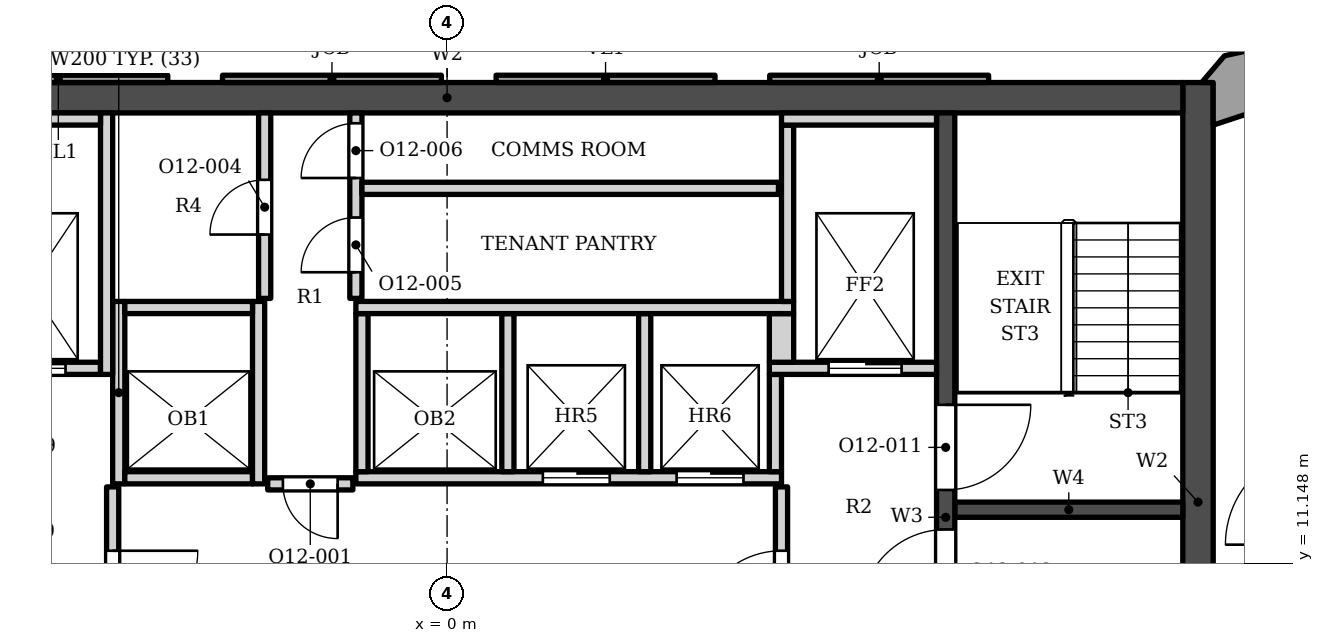
"""IFC4 building model, lengths in metres.
Left out: names, types, materials, properties, quantities, classifications, styles, units other than length and angle.
Written with IfcOpenShell. Run it as: python <this file> out.ifc"""

import sys

from ifc_helpers import new_model, si_unit, direction, frame, frame_2d, origin, place, context, subcontext, project, spatial, polyline, rectangle, outline, extrude, element, fill, save


model = new_model("IFC4")
c1 = context("Model", 3, precision=1e-05, world=origin(), true_north=direction((0.0, 1.0)))
c2 = subcontext(c1, "Body", "Model", "MODEL_VIEW")
j1 = project(units=[si_unit("LENGTHUNIT", "METRE"), si_unit("PLANEANGLEUNIT", "RADIAN")], contexts=[c1])
p1 = place(None, origin())
s1 = spatial("IfcSite", under=j1, at=p1, CompositionType="ELEMENT")
p2 = place(p1, origin())
s2 = spatial("IfcBuilding", under=s1, at=p2, CompositionType="ELEMENT")
p3 = place(p2, frame((0.0, 0.0, 279.4)))
s3 = spatial("IfcBuildingStorey", under=s2, at=p3, CompositionType="ELEMENT", Elevation=279.4)
p4 = place(p3, frame((-12.1, 18.802, 0.0), z_axis=(0.0, 0.0, 1.0), x_axis=(1.0, 0.0, 0.0)))
e1 = element("IfcWall", 1, at=p4, inside=s3, PredefinedType="SHEAR", context=c2, shape_type="SweptSolid", body=[
    extrude(rectangle(XDim=24.2, YDim=0.5, at=frame_2d((12.1, 0.0))), origin(), (0.0, 0.0, 1.0), 3.9),
])
p5 = place(p3, frame((12.35, 5.253, 0.0), z_axis=(0.0, 0.0, 1.0), x_axis=(0.0, 1.0, 0.0)))
e2 = element("IfcWall", 2, at=p5, inside=s3, PredefinedType="SHEAR", context=c2, shape_type="SweptSolid", body=[
    extrude(rectangle(XDim=13.8, YDim=0.5, at=frame_2d((6.9, 0.0))), origin(), (0.0, 0.0, 1.0), 3.9),
])
p6 = place(p3, frame((8.2, 5.253, 0.0), z_axis=(0.0, 0.0, 1.0), x_axis=(0.0, 1.0, 0.0)))
e3 = element("IfcWall", 3, at=p6, inside=s3, PredefinedType="SHEAR", context=c2, shape_type="SweptSolid", body=[
    extrude(rectangle(XDim=13.3, YDim=0.3, at=frame_2d((6.65, 0.0))), origin(), (0.0, 0.0, 1.0), 3.9),
])
p7 = place(p6, frame((7.1, 0.0, 0.0)))
e4 = element("IfcOpeningElement", 4, at=p7, cuts=e3, PredefinedType="OPENING", context=c2, shape_type="SweptSolid", body=[
    extrude(rectangle(XDim=1.4, YDim=2.1, at=frame_2d((0.7, 1.05))), frame((0.0, 0.16, 0.0), z_axis=(0.0, -1.0, 0.0), x_axis=(1.0, 0.0, 0.0)), (0.0, 0.0, 1.0), 0.32),
])
p8 = place(p6, frame((5.05, 0.0, 0.0)))
e5 = element("IfcOpeningElement", 5, at=p8, cuts=e3, PredefinedType="OPENING", context=c2, shape_type="SweptSolid", body=[
    extrude(rectangle(XDim=1.4, YDim=2.1, at=frame_2d((0.7, 1.05))), frame((0.0, 0.16, 0.0), z_axis=(0.0, -1.0, 0.0), x_axis=(1.0, 0.0, 0.0)), (0.0, 0.0, 1.0), 0.32),
])
p9 = place(p3, frame((8.35, 12.028, 0.0), z_axis=(0.0, 0.0, 1.0), x_axis=(1.0, 0.0, 0.0)))
e6 = element("IfcWall", 6, at=p9, inside=s3, PredefinedType="SHEAR", context=c2, shape_type="SweptSolid", body=[
    extrude(rectangle(XDim=3.75, YDim=0.25, at=frame_2d((1.875, 0.0))), origin(), (0.0, 0.0, 1.0), 3.9),
])
p10 = place(p3, origin())
e7 = element("IfcWall", 7, at=p10, inside=s3, PredefinedType="SOLIDWALL", context=c2, shape_type="SweptSolid", body=[
    extrude(outline(polyline([(5.306, 19.173), (5.306, 19.052), (8.906, 19.052), (8.906, 19.173), (5.306, 19.173)])), origin(), (0.0, 0.0, 1.0), 3.0),
])
p11 = place(p3, origin())
e8 = element("IfcWall", 8, at=p11, inside=s3, PredefinedType="ELEMENTEDWALL", context=c2, shape_type="SweptSolid", body=[
    extrude(outline(polyline([(0.806, 19.173), (0.806, 19.052), (4.406, 19.052), (4.406, 19.173), (0.806, 19.173)])), origin(), (0.0, 0.0, 1.0), 3.0),
])
p12 = place(p3, origin())
e9 = element("IfcWall", 9, at=p12, inside=s3, PredefinedType="SOLIDWALL", context=c2, shape_type="SweptSolid", body=[
    extrude(outline(polyline([(-3.694, 19.173), (-3.694, 19.052), (-0.094, 19.052), (-0.094, 19.173), (-3.694, 19.173)])), origin(), (0.0, 0.0, 1.0), 3.0),
])
p13 = place(p3, origin())
e10 = element("IfcWall", 10, at=p13, inside=s3, PredefinedType="ELEMENTEDWALL", context=c2, shape_type="SweptSolid", body=[
    extrude(outline(polyline([(-8.194, 19.173), (-8.194, 19.052), (-4.594, 19.052), (-4.594, 19.173), (-8.194, 19.173)])), origin(), (0.0, 0.0, 1.0), 3.0),
])
p14 = place(p3, origin())
e11 = element("IfcWall", 11, at=p14, inside=s3, PredefinedType="SOLIDWALL", context=c2, shape_type="SweptSolid", body=[
    extrude(outline(polyline([(14.201, 18.883), (14.008, 19.762), (12.784, 19.492), (12.41, 19.052), (12.6, 19.052), (12.6, 18.352), (14.201, 18.883)])), origin(), (0.0, 0.0, 1.0), 3.0),
])
p15 = place(p3, frame((-5.5, 9.103, 0.0), z_axis=(0.0, 0.0, 1.0), x_axis=(0.0, 1.0, 0.0)))
e12 = element("IfcWall", 12, at=p15, inside=s3, PredefinedType="SOLIDWALL", context=c2, shape_type="SweptSolid", body=[
    extrude(rectangle(XDim=3.3, YDim=0.2, at=frame_2d((1.65, 0.0))), origin(), (0.0, 0.0, 1.0), 3.73),
])
p16 = place(p15, frame((0.85, 0.0, 0.0)))
e13 = element("IfcOpeningElement", 13, at=p16, cuts=e12, PredefinedType="OPENING", context=c2, shape_type="SweptSolid", body=[
    extrude(rectangle(XDim=1.4, YDim=2.1, at=frame_2d((0.7, 1.05))), frame((0.0, 0.11, 0.0), z_axis=(0.0, -1.0, 0.0), x_axis=(1.0, 0.0, 0.0)), (0.0, 0.0, 1.0), 0.22),
])
p17 = place(p3, frame((5.5, 9.103, 0.0), z_axis=(0.0, 0.0, 1.0), x_axis=(0.0, 1.0, 0.0)))
e14 = element("IfcWall", 14, at=p17, inside=s3, PredefinedType="SOLIDWALL", context=c2, shape_type="SweptSolid", body=[
    extrude(rectangle(XDim=3.3, YDim=0.2, at=frame_2d((1.65, 0.0))), origin(), (0.0, 0.0, 1.0), 3.73),
])
p18 = place(p17, frame((0.85, 0.0, 0.0)))
e15 = element("IfcOpeningElement", 15, at=p18, cuts=e14, PredefinedType="OPENING", context=c2, shape_type="SweptSolid", body=[
    extrude(rectangle(XDim=1.4, YDim=2.1, at=frame_2d((0.7, 1.05))), frame((0.0, 0.11, 0.0), z_axis=(0.0, -1.0, 0.0), x_axis=(1.0, 0.0, 0.0)), (0.0, 0.0, 1.0), 0.22),
])
p19 = place(p3, frame((-2.95, 12.453, 0.0), z_axis=(0.0, 0.0, 1.0), x_axis=(1.0, 0.0, 0.0)))
e16 = element("IfcWall", 16, at=p19, inside=s3, PredefinedType="SOLIDWALL", context=c2, shape_type="SweptSolid", body=[
    extrude(rectangle(XDim=1.4, YDim=0.2, at=frame_2d((0.7, 0.0))), origin(), (0.0, 0.0, 1.0), 3.73),
])
p20 = place(p19, frame((0.25, 0.0, 0.0)))
e17 = element("IfcOpeningElement", 17, at=p20, cuts=e16, PredefinedType="OPENING", context=c2, shape_type="SweptSolid", body=[
    extrude(rectangle(XDim=0.9, YDim=2.1, at=frame_2d((0.45, 1.05))), frame((0.0, 0.11, 0.0), z_axis=(0.0, -1.0, 0.0), x_axis=(1.0, 0.0, 0.0)), (0.0, 0.0, 1.0), 0.22),
])
p21 = place(p3, frame((-5.4, 12.453, 0.0), z_axis=(0.0, 0.0, 1.0), x_axis=(0.0, 1.0, 0.0)))
e18 = element("IfcWall", 18, at=p21, inside=s3, PredefinedType="SOLIDWALL", context=c2, shape_type="SweptSolid", body=[
    extrude(rectangle(XDim=3.0, YDim=0.2, at=frame_2d((1.5, 0.0))), origin(), (0.0, 0.0, 1.0), 3.73),
])
p22 = place(p3, frame((-5.3, 12.552, 0.0), z_axis=(0.0, 0.0, 1.0), x_axis=(1.0, 0.0, 0.0)))
e19 = element("IfcWall", 19, at=p22, inside=s3, PredefinedType="SOLIDWALL", context=c2, shape_type="SweptSolid", body=[
    extrude(rectangle(XDim=2.1, YDim=0.2, at=frame_2d((1.05, 0.0))), origin(), (0.0, 0.0, 1.0), 3.73),
])
p23 = place(p3, frame((-3.1, 12.453, 0.0), z_axis=(0.0, 0.0, 1.0), x_axis=(0.0, 1.0, 0.0)))
e20 = element("IfcWall", 20, at=p23, inside=s3, PredefinedType="SOLIDWALL", context=c2, shape_type="SweptSolid", body=[
    extrude(rectangle(XDim=3.0, YDim=0.2, at=frame_2d((1.5, 0.0))), origin(), (0.0, 0.0, 1.0), 3.73),
])
p24 = place(p3, frame((-1.5, 12.552, 0.0), z_axis=(0.0, 0.0, 1.0), x_axis=(1.0, 0.0, 0.0)))
e21 = element("IfcWall", 21, at=p24, inside=s3, PredefinedType="SOLIDWALL", context=c2, shape_type="SweptSolid", body=[
    extrude(rectangle(XDim=7.0, YDim=0.2, at=frame_2d((3.5, 0.0))), origin(), (0.0, 0.0, 1.0), 3.73),
])
p25 = place(p24, frame((3.075, 0.0, 0.0)))
e22 = element("IfcOpeningElement", 22, at=p25, cuts=e21, PredefinedType="OPENING", context=c2, shape_type="SweptSolid", body=[
    extrude(rectangle(XDim=1.1, YDim=2.1, at=frame_2d((0.55, 1.05))), frame((0.0, 0.11, 0.0), z_axis=(0.0, -1.0, 0.0), x_axis=(1.0, 0.0, 0.0)), (0.0, 0.0, 1.0), 0.22),
])
p26 = place(p24, frame((5.275, 0.0, 0.0)))
e23 = element("IfcOpeningElement", 23, at=p26, cuts=e21, PredefinedType="OPENING", context=c2, shape_type="SweptSolid", body=[
    extrude(rectangle(XDim=1.1, YDim=2.1, at=frame_2d((0.55, 1.05))), frame((0.0, 0.11, 0.0), z_axis=(0.0, -1.0, 0.0), x_axis=(1.0, 0.0, 0.0)), (0.0, 0.0, 1.0), 0.22),
])
for number, where, z_axis, x_axis in (
    (24, (-1.4, 12.653, 0.0), (0.0, 0.0, 1.0), (0.0, 1.0, 0.0)),
    (25, (1.0, 12.653, 0.0), (0.0, 0.0, 1.0), (0.0, 1.0, 0.0)),
    (26, (3.25, 12.653, 0.0), (0.0, 0.0, 1.0), (0.0, 1.0, 0.0)),
):
    element("IfcWall", number, at=place(p3, frame(where, z_axis=z_axis, x_axis=x_axis)), inside=s3, PredefinedType="SOLIDWALL", context=c2, shape_type="SweptSolid", body=[
        extrude(rectangle(XDim=2.6, YDim=0.2, at=frame_2d((1.3, 0.0))), origin(), (0.0, 0.0, 1.0), 3.73),
    ])
p27 = place(p3, frame((5.4, 12.653, 0.0), z_axis=(0.0, 0.0, 1.0), x_axis=(0.0, 1.0, 0.0)))
e27 = element("IfcWall", 27, at=p27, inside=s3, PredefinedType="SOLIDWALL", context=c2, shape_type="SweptSolid", body=[
    extrude(rectangle(XDim=1.6, YDim=0.2, at=frame_2d((0.8, 0.0))), origin(), (0.0, 0.0, 1.0), 3.73),
])
p28 = place(p3, frame((-8.05, 14.353, 0.0), z_axis=(0.0, 0.0, 1.0), x_axis=(1.0, 0.0, 0.0)))
e28 = element("IfcWall", 28, at=p28, inside=s3, PredefinedType="SOLIDWALL", context=c2, shape_type="SweptSolid", body=[
    extrude(rectangle(XDim=2.35, YDim=0.2, at=frame_2d((1.175, 0.0))), origin(), (0.0, 0.0, 1.0), 3.73),
])
p29 = place(p28, frame((0.575, 0.0, 0.0)))
e29 = element("IfcOpeningElement", 29, at=p29, cuts=e28, PredefinedType="OPENING", context=c2, shape_type="SweptSolid", body=[
    extrude(rectangle(XDim=1.2, YDim=2.1, at=frame_2d((0.6, 1.05))), frame((0.0, 0.11, 0.0), z_axis=(0.0, -1.0, 0.0), x_axis=(1.0, 0.0, 0.0)), (0.0, 0.0, 1.0), 0.22),
])
p30 = place(p3, frame((-5.6, 14.253, 0.0), z_axis=(0.0, 0.0, 1.0), x_axis=(0.0, 1.0, 0.0)))
e30 = element("IfcWall", 30, at=p30, inside=s3, PredefinedType="SOLIDWALL", context=c2, shape_type="SweptSolid", body=[
    extrude(rectangle(XDim=4.3, YDim=0.2, at=frame_2d((2.15, 0.0))), origin(), (0.0, 0.0, 1.0), 3.73),
])
p31 = place(p3, frame((5.3, 14.353, 0.0), z_axis=(0.0, 0.0, 1.0), x_axis=(1.0, 0.0, 0.0)))
e31 = element("IfcWall", 31, at=p31, inside=s3, PredefinedType="SOLIDWALL", context=c2, shape_type="SweptSolid", body=[
    extrude(rectangle(XDim=2.75, YDim=0.2, at=frame_2d((1.375, 0.0))), origin(), (0.0, 0.0, 1.0), 3.73),
])
p32 = place(p31, frame((0.975, 0.0, 0.0)))
e32 = element("IfcOpeningElement", 32, at=p32, cuts=e31, PredefinedType="OPENING", context=c2, shape_type="SweptSolid", body=[
    extrude(rectangle(XDim=1.2, YDim=2.1, at=frame_2d((0.6, 1.05))), frame((0.0, 0.11, 0.0), z_axis=(0.0, -1.0, 0.0), x_axis=(1.0, 0.0, 0.0)), (0.0, 0.0, 1.0), 0.22),
])
p33 = place(p3, frame((5.5, 14.453, 0.0), z_axis=(0.0, 0.0, 1.0), x_axis=(0.0, 1.0, 0.0)))
e33 = element("IfcWall", 33, at=p33, inside=s3, PredefinedType="SOLIDWALL", context=c2, shape_type="SweptSolid", body=[
    extrude(rectangle(XDim=0.8, YDim=0.4, at=frame_2d((0.4, 0.0))), origin(), (0.0, 0.0, 1.0), 3.73),
])
p34 = place(p3, frame((-5.3, 15.353, 0.0), z_axis=(0.0, 0.0, 1.0), x_axis=(1.0, 0.0, 0.0)))
e34 = element("IfcWall", 34, at=p34, inside=s3, PredefinedType="SOLIDWALL", context=c2, shape_type="SweptSolid", body=[
    extrude(rectangle(XDim=2.1, YDim=0.2, at=frame_2d((1.05, 0.0))), origin(), (0.0, 0.0, 1.0), 3.73),
])
p35 = place(p3, frame((-1.5, 15.353, 0.0), z_axis=(0.0, 0.0, 1.0), x_axis=(1.0, 0.0, 0.0)))
e35 = element("IfcWall", 35, at=p35, inside=s3, PredefinedType="SOLIDWALL", context=c2, shape_type="SweptSolid", body=[
    extrude(rectangle(XDim=7.2, YDim=0.2, at=frame_2d((3.6, 0.0))), origin(), (0.0, 0.0, 1.0), 3.73),
])
p36 = place(p3, frame((5.6, 15.453, 0.0), z_axis=(0.0, 0.0, 1.0), x_axis=(0.0, 1.0, 0.0)))
e36 = element("IfcWall", 36, at=p36, inside=s3, PredefinedType="SOLIDWALL", context=c2, shape_type="SweptSolid", body=[
    extrude(rectangle(XDim=2.9, YDim=0.2, at=frame_2d((1.45, 0.0))), origin(), (0.0, 0.0, 1.0), 3.73),
])
p37 = place(p3, frame((-3.0, 15.503, 0.0), z_axis=(0.0, 0.0, 1.0), x_axis=(0.0, 1.0, 0.0)))
e37 = element("IfcWall", 37, at=p37, inside=s3, PredefinedType="SOLIDWALL", context=c2, shape_type="SweptSolid", body=[
    extrude(rectangle(XDim=3.05, YDim=0.2, at=frame_2d((1.525, 0.0))), origin(), (0.0, 0.0, 1.0), 3.73),
])
p38 = place(p37, frame((1.05, 0.0, 0.0)))
e38 = element("IfcOpeningElement", 38, at=p38, cuts=e37, PredefinedType="OPENING", context=c2, shape_type="SweptSolid", body=[
    extrude(rectangle(XDim=0.9, YDim=2.1, at=frame_2d((0.45, 1.05))), frame((0.0, 0.11, 0.0), z_axis=(0.0, -1.0, 0.0), x_axis=(1.0, 0.0, 0.0)), (0.0, 0.0, 1.0), 0.22),
])
p39 = place(p3, frame((-1.5, 15.503, 0.0), z_axis=(0.0, 0.0, 1.0), x_axis=(0.0, 1.0, 0.0)))
e39 = element("IfcWall", 39, at=p39, inside=s3, PredefinedType="SOLIDWALL", context=c2, shape_type="SweptSolid", body=[
    extrude(rectangle(XDim=3.05, YDim=0.2, at=frame_2d((1.525, 0.0))), origin(), (0.0, 0.0, 1.0), 3.73),
])
p40 = place(p39, frame((0.43, 0.0, 0.0)))
e40 = element("IfcOpeningElement", 40, at=p40, cuts=e39, PredefinedType="OPENING", context=c2, shape_type="SweptSolid", body=[
    extrude(rectangle(XDim=0.9, YDim=2.1, at=frame_2d((0.45, 1.05))), frame((0.0, 0.11, 0.0), z_axis=(0.0, -1.0, 0.0), x_axis=(1.0, 0.0, 0.0)), (0.0, 0.0, 1.0), 0.22),
])
p41 = place(p39, frame((1.98, 0.0, 0.0)))
e41 = element("IfcOpeningElement", 41, at=p41, cuts=e39, PredefinedType="OPENING", context=c2, shape_type="SweptSolid", body=[
    extrude(rectangle(XDim=0.9, YDim=2.1, at=frame_2d((0.45, 1.05))), frame((0.0, 0.11, 0.0), z_axis=(0.0, -1.0, 0.0), x_axis=(1.0, 0.0, 0.0)), (0.0, 0.0, 1.0), 0.22),
])
p42 = place(p3, frame((-1.4, 17.312, 0.0), z_axis=(0.0, 0.0, 1.0), x_axis=(1.0, 0.0, 0.0)))
e42 = element("IfcWall", 42, at=p42, inside=s3, PredefinedType="SOLIDWALL", context=c2, shape_type="SweptSolid", body=[
    extrude(rectangle(XDim=6.85, YDim=0.2, at=frame_2d((3.425, 0.0))), origin(), (0.0, 0.0, 1.0), 3.73),
])
p43 = place(p3, frame((-8.05, 18.453, 0.0), z_axis=(0.0, 0.0, 1.0), x_axis=(1.0, 0.0, 0.0)))
e43 = element("IfcWall", 43, at=p43, inside=s3, PredefinedType="SOLIDWALL", context=c2, shape_type="SweptSolid", body=[
    extrude(rectangle(XDim=2.35, YDim=0.2, at=frame_2d((1.175, 0.0))), origin(), (0.0, 0.0, 1.0), 3.73),
])
p44 = place(p3, frame((5.5, 18.453, 0.0), z_axis=(0.0, 0.0, 1.0), x_axis=(1.0, 0.0, 0.0)))
e44 = element("IfcWall", 44, at=p44, inside=s3, PredefinedType="SOLIDWALL", context=c2, shape_type="SweptSolid", body=[
    extrude(rectangle(XDim=2.55, YDim=0.2, at=frame_2d((1.275, 0.0))), origin(), (0.0, 0.0, 1.0), 3.73),
])
p45 = place(p25, origin())
e45 = element("IfcDoor", 45, at=p45, inside=s3, OperationType="DOUBLE_DOOR_SLIDING", PredefinedType="DOOR", context=c2, shape_type="SweptSolid", body=[
    extrude(rectangle(XDim=1.1, YDim=2.1, at=frame_2d((0.55, 1.05))), frame((0.0, 0.025, 0.0), z_axis=(0.0, -1.0, 0.0), x_axis=(1.0, 0.0, 0.0)), (0.0, 0.0, 1.0), 0.05),
])
fill(e22, e45)
p46 = place(p26, origin())
e46 = element("IfcDoor", 46, at=p46, inside=s3, OperationType="DOUBLE_DOOR_SLIDING", PredefinedType="DOOR", context=c2, shape_type="SweptSolid", body=[
    extrude(rectangle(XDim=1.1, YDim=2.1, at=frame_2d((0.55, 1.05))), frame((0.0, 0.025, 0.0), z_axis=(0.0, -1.0, 0.0), x_axis=(1.0, 0.0, 0.0)), (0.0, 0.0, 1.0), 0.05),
])
fill(e23, e46)
p47 = place(p29, origin())
e47 = element("IfcDoor", 47, at=p47, inside=s3, OperationType="DOUBLE_DOOR_SLIDING", PredefinedType="DOOR", context=c2, shape_type="SweptSolid", body=[
    extrude(rectangle(XDim=1.2, YDim=2.1, at=frame_2d((0.6, 1.05))), frame((0.0, 0.025, 0.0), z_axis=(0.0, -1.0, 0.0), x_axis=(1.0, 0.0, 0.0)), (0.0, 0.0, 1.0), 0.05),
])
fill(e29, e47)
p48 = place(p32, origin())
e48 = element("IfcDoor", 48, at=p48, inside=s3, OperationType="DOUBLE_DOOR_SLIDING", PredefinedType="DOOR", context=c2, shape_type="SweptSolid", body=[
    extrude(rectangle(XDim=1.2, YDim=2.1, at=frame_2d((0.6, 1.05))), frame((0.0, 0.025, 0.0), z_axis=(0.0, -1.0, 0.0), x_axis=(1.0, 0.0, 0.0)), (0.0, 0.0, 1.0), 0.05),
])
fill(e32, e48)
p49 = place(p7, origin())
e49 = element("IfcDoor", 49, at=p49, inside=s3, OperationType="SINGLE_SWING_RIGHT", PredefinedType="DOOR", context=c2, shape_type="SweptSolid", body=[
    extrude(rectangle(XDim=1.4, YDim=2.1, at=frame_2d((0.7, 1.05))), frame((0.0, 0.025, 0.0), z_axis=(0.0, -1.0, 0.0), x_axis=(1.0, 0.0, 0.0)), (0.0, 0.0, 1.0), 0.05),
])
fill(e4, e49)
p50 = place(p8, origin())
e50 = element("IfcDoor", 50, at=p50, inside=s3, OperationType="SINGLE_SWING_LEFT", PredefinedType="DOOR", context=c2, shape_type="SweptSolid", body=[
    extrude(rectangle(XDim=1.4, YDim=2.1, at=frame_2d((0.7, 1.05))), frame((0.0, 0.025, 0.0), z_axis=(0.0, -1.0, 0.0), x_axis=(1.0, 0.0, 0.0)), (0.0, 0.0, 1.0), 0.05),
])
fill(e5, e50)
p51 = place(p20, origin())
e51 = element("IfcDoor", 51, at=p51, inside=s3, OperationType="SINGLE_SWING_RIGHT", PredefinedType="DOOR", context=c2, shape_type="SweptSolid", body=[
    extrude(rectangle(XDim=0.9, YDim=2.1, at=frame_2d((0.45, 1.05))), frame((0.0, 0.025, 0.0), z_axis=(0.0, -1.0, 0.0), x_axis=(1.0, 0.0, 0.0)), (0.0, 0.0, 1.0), 0.05),
])
fill(e17, e51)
p52 = place(p16, origin())
e52 = element("IfcDoor", 52, at=p52, inside=s3, OperationType="SINGLE_SWING_RIGHT", PredefinedType="DOOR", context=c2, shape_type="SweptSolid", body=[
    extrude(rectangle(XDim=1.4, YDim=2.1, at=frame_2d((0.7, 1.05))), frame((0.0, 0.025, 0.0), z_axis=(0.0, -1.0, 0.0), x_axis=(1.0, 0.0, 0.0)), (0.0, 0.0, 1.0), 0.05),
])
fill(e13, e52)
p53 = place(p18, origin())
e53 = element("IfcDoor", 53, at=p53, inside=s3, OperationType="SINGLE_SWING_LEFT", PredefinedType="DOOR", context=c2, shape_type="SweptSolid", body=[
    extrude(rectangle(XDim=1.4, YDim=2.1, at=frame_2d((0.7, 1.05))), frame((0.0, 0.025, 0.0), z_axis=(0.0, -1.0, 0.0), x_axis=(1.0, 0.0, 0.0)), (0.0, 0.0, 1.0), 0.05),
])
fill(e15, e53)
p54 = place(p38, origin())
e54 = element("IfcDoor", 54, at=p54, inside=s3, OperationType="SINGLE_SWING_LEFT", PredefinedType="DOOR", context=c2, shape_type="SweptSolid", body=[
    extrude(rectangle(XDim=0.9, YDim=2.1, at=frame_2d((0.45, 1.05))), frame((0.0, 0.025, 0.0), z_axis=(0.0, -1.0, 0.0), x_axis=(1.0, 0.0, 0.0)), (0.0, 0.0, 1.0), 0.05),
])
fill(e38, e54)
p55 = place(p40, origin())
e55 = element("IfcDoor", 55, at=p55, inside=s3, OperationType="SINGLE_SWING_LEFT", PredefinedType="DOOR", context=c2, shape_type="SweptSolid", body=[
    extrude(rectangle(XDim=0.9, YDim=2.1, at=frame_2d((0.45, 1.05))), frame((0.0, 0.025, 0.0), z_axis=(0.0, -1.0, 0.0), x_axis=(1.0, 0.0, 0.0)), (0.0, 0.0, 1.0), 0.05),
])
fill(e40, e55)
p56 = place(p41, origin())
e56 = element("IfcDoor", 56, at=p56, inside=s3, OperationType="SINGLE_SWING_LEFT", PredefinedType="DOOR", context=c2, shape_type="SweptSolid", body=[
    extrude(rectangle(XDim=0.9, YDim=2.1, at=frame_2d((0.45, 1.05))), frame((0.0, 0.025, 0.0), z_axis=(0.0, -1.0, 0.0), x_axis=(1.0, 0.0, 0.0)), (0.0, 0.0, 1.0), 0.05),
])
fill(e41, e56)
save(model, sys.argv[1])
